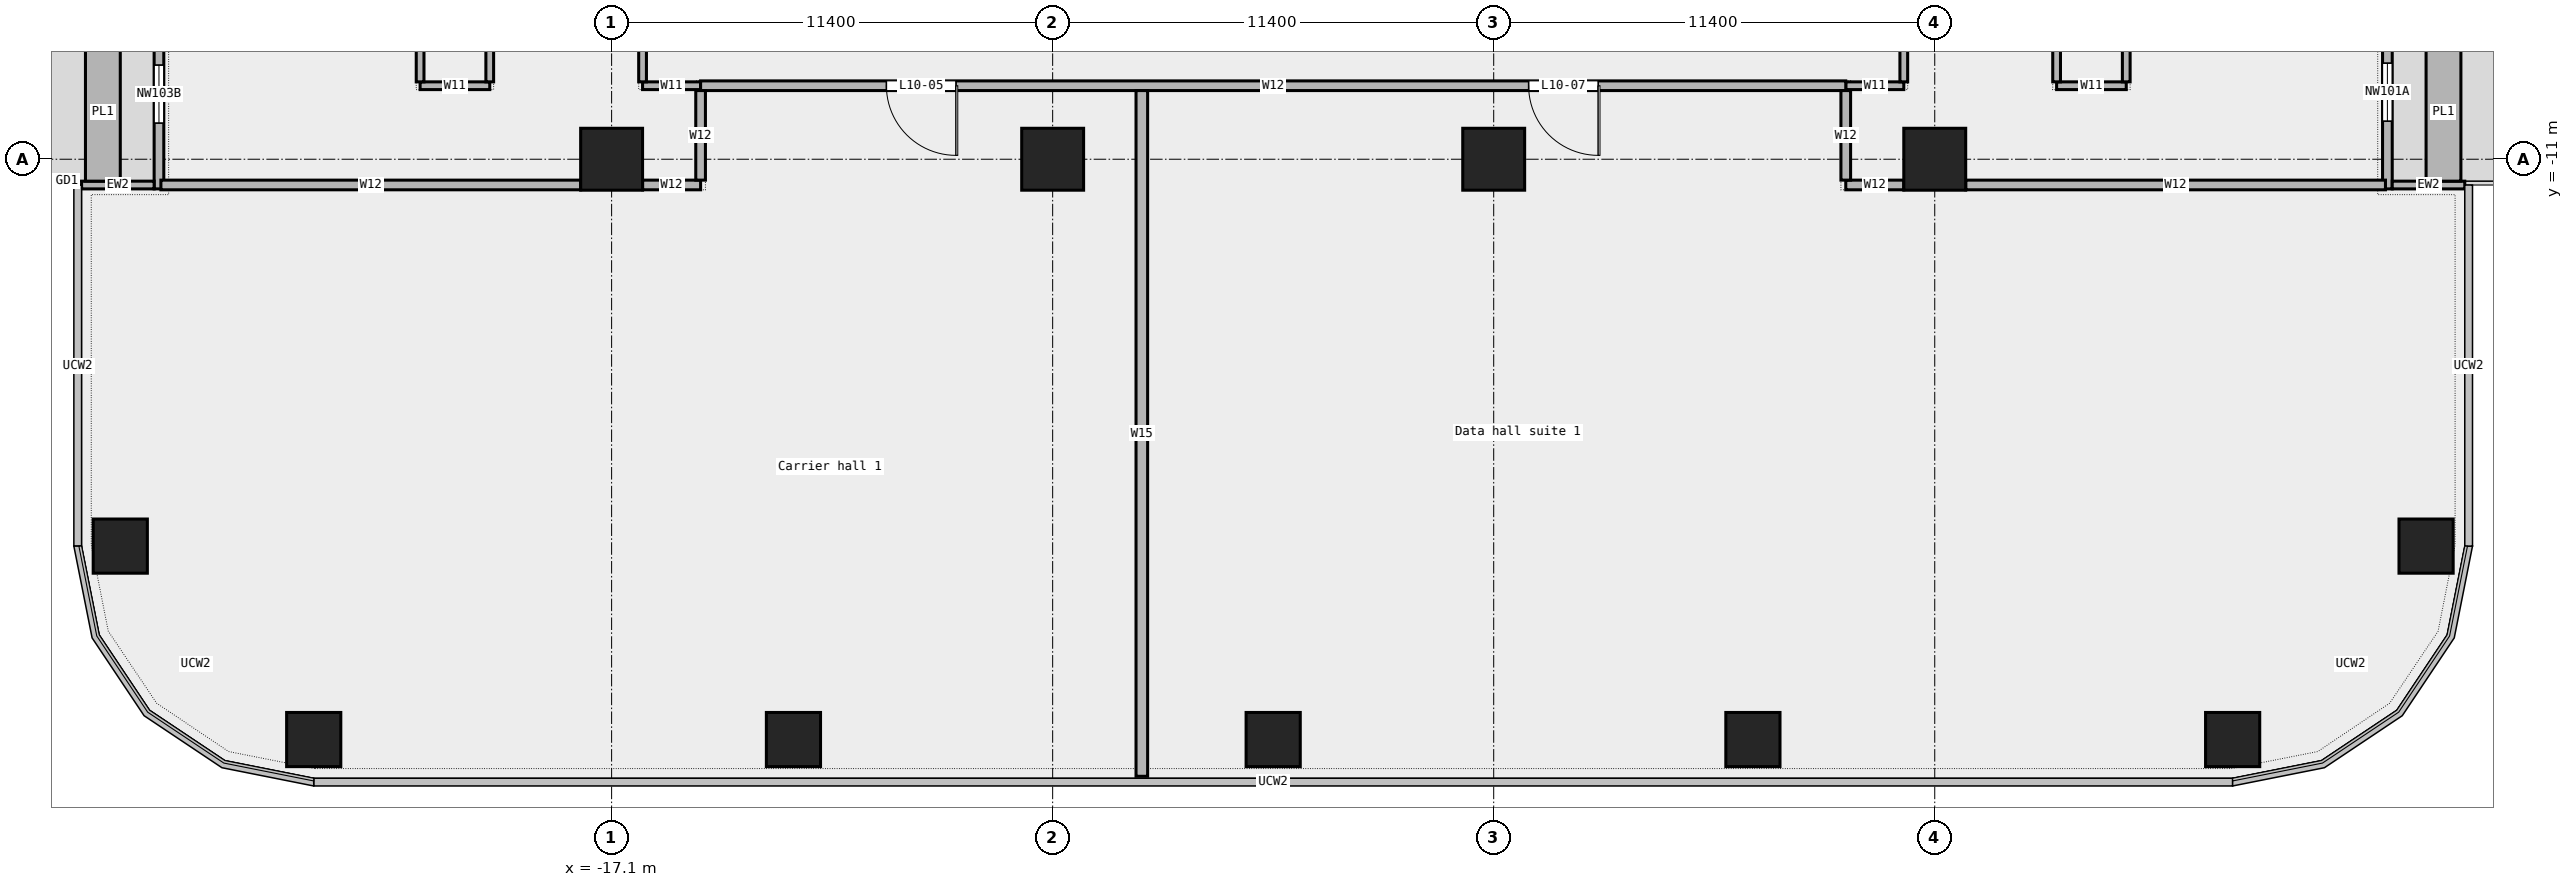
"""IFC4 building model, lengths in metres.
Left out: names, types, materials, properties, quantities, classifications, styles, units other than length and angle.
Written with IfcOpenShell. Run it as: python <this file> out.ifc"""

import sys

from ifc_helpers import new_model, si_unit, direction, frame, frame_2d, origin, origin_2d, place, context, subcontext, project, spatial, rectangle, extrude, element, fill, save


model = new_model("IFC4")
c1 = context("Model", 3, precision=1e-05, world=origin(), true_north=direction((0.0, 1.0)))
c2 = subcontext(c1, "Body", "Model", "MODEL_VIEW")
j1 = project(units=[si_unit("LENGTHUNIT", "METRE"), si_unit("PLANEANGLEUNIT", "RADIAN")], contexts=[c1])
p1 = place(None, origin())
s1 = spatial("IfcSite", under=j1, at=p1, CompositionType="ELEMENT")
p2 = place(p1, origin())
s2 = spatial("IfcBuilding", under=s1, at=p2, CompositionType="ELEMENT")
p3 = place(p2, frame((0.0, 0.0, 55.0)))
s3 = spatial("IfcBuildingStorey", under=s2, at=p3, CompositionType="ELEMENT", Elevation=55.0)
for number, where, z_axis, x_axis in (
    (1, (-24.8, -26.0, 0.0), (0.0, 0.0, 1.0), (1.0, 0.0, 0.0)),
    (2, (-12.4, -26.0, 0.0), (0.0, 0.0, 1.0), (1.0, 0.0, 0.0)),
    (3, (0.0, -26.0, 0.0), (0.0, 0.0, 1.0), (1.0, 0.0, 0.0)),
    (4, (12.4, -26.0, 0.0), (0.0, 0.0, 1.0), (1.0, 0.0, 0.0)),
    (5, (24.8, -26.0, 0.0), (0.0, 0.0, 1.0), (1.0, 0.0, 0.0)),
    (6, (29.8, -21.0, 0.0), (0.0, 0.0, 1.0), (1.0, 0.0, 0.0)),
    (7, (-29.8, -21.0, 0.0), (0.0, 0.0, 1.0), (1.0, 0.0, 0.0)),
):
    element("IfcColumn", number, at=place(p3, frame(where, z_axis=z_axis, x_axis=x_axis)), inside=s3, PredefinedType="COLUMN", context=c2, shape_type="SweptSolid", body=[
        extrude(rectangle(XDim=1.4, YDim=1.4, at=origin_2d()), origin(), (0.0, 0.0, 1.0), 4.35),
    ])
for number, where, z_axis, x_axis in (
    (8, (-17.1, -11.0, 0.0), (0.0, 0.0, 1.0), (1.0, 0.0, 0.0)),
    (9, (-5.7, -11.0, 0.0), (0.0, 0.0, 1.0), (1.0, 0.0, 0.0)),
    (10, (5.7, -11.0, 0.0), (0.0, 0.0, 1.0), (1.0, 0.0, 0.0)),
    (11, (17.1, -11.0, 0.0), (0.0, 0.0, 1.0), (1.0, 0.0, 0.0)),
):
    element("IfcColumn", number, at=place(p3, frame(where, z_axis=z_axis, x_axis=x_axis)), inside=s3, PredefinedType="COLUMN", context=c2, shape_type="SweptSolid", body=[
        extrude(rectangle(XDim=1.6, YDim=1.6, at=origin_2d()), origin(), (0.0, 0.0, 1.0), 4.35),
    ])
p4 = place(p3, frame((28.8, -11.767, 0.0), z_axis=(0.0, 0.0, 1.0), x_axis=(0.0, 1.0, 0.0)))
e12 = element("IfcWall", 12, at=p4, inside=s3, PredefinedType="STANDARD", context=c2, shape_type="SweptSolid", body=[
    extrude(rectangle(XDim=14.2, YDim=0.25, at=frame_2d((7.1, 0.0))), origin(), (0.0, 0.0, 1.0), 4.35),
])
p5 = place(p4, frame((1.75, 0.0, 0.45)))
e13 = element("IfcOpeningElement", 13, at=p5, cuts=e12, PredefinedType="OPENING", context=c2, shape_type="SweptSolid", body=[
    extrude(rectangle(XDim=1.5, YDim=3.0, at=frame_2d((0.75, 1.5))), frame((0.0, 0.137, 0.0), z_axis=(0.0, -1.0, 0.0), x_axis=(1.0, 0.0, 0.0)), (0.0, 0.0, 1.0), 0.274),
])
p6 = place(p4, frame((6.25, 0.0, 0.0)))
e14 = element("IfcOpeningElement", 14, at=p6, cuts=e12, PredefinedType="OPENING", context=c2, shape_type="SweptSolid", body=[
    extrude(rectangle(XDim=1.8, YDim=2.4, at=frame_2d((0.9, 1.2))), frame((0.0, 0.137, 0.0), z_axis=(0.0, -1.0, 0.0), x_axis=(1.0, 0.0, 0.0)), (0.0, 0.0, 1.0), 0.274),
])
p7 = place(p4, frame((11.0, 0.0, 0.45)))
e15 = element("IfcOpeningElement", 15, at=p7, cuts=e12, PredefinedType="OPENING", context=c2, shape_type="SweptSolid", body=[
    extrude(rectangle(XDim=1.5, YDim=3.0, at=frame_2d((0.75, 1.5))), frame((0.0, 0.137, 0.0), z_axis=(0.0, -1.0, 0.0), x_axis=(1.0, 0.0, 0.0)), (0.0, 0.0, 1.0), 0.274),
])
p8 = place(p3, frame((30.8, -11.667, 0.0), z_axis=(0.0, 0.0, 1.0), x_axis=(-1.0, 0.0, 0.0)))
e16 = element("IfcWall", 16, at=p8, inside=s3, PredefinedType="STANDARD", context=c2, shape_type="SweptSolid", body=[
    extrude(rectangle(XDim=1.875, YDim=0.2, at=frame_2d((0.938, 0.0))), origin(), (0.0, 0.0, 1.0), 4.35),
])
p9 = place(p3, frame((30.25, -11.567, 0.0), z_axis=(0.0, 0.0, 1.0), x_axis=(0.0, 1.0, 0.0)))
e17 = element("IfcWall", 17, at=p9, inside=s3, PredefinedType="STANDARD", context=c2, shape_type="SweptSolid", body=[
    extrude(rectangle(XDim=3.6, YDim=0.9, at=frame_2d((1.8, 0.0))), origin(), (0.0, 0.0, 1.0), 0.7),
])
p10 = place(p3, frame((-28.8, 2.433, 0.0), z_axis=(0.0, 0.0, 1.0), x_axis=(0.0, -1.0, 0.0)))
e18 = element("IfcWall", 18, at=p10, inside=s3, PredefinedType="STANDARD", context=c2, shape_type="SweptSolid", body=[
    extrude(rectangle(XDim=14.2, YDim=0.25, at=frame_2d((7.1, 0.0))), origin(), (0.0, 0.0, 1.0), 4.35),
])
p11 = place(p10, frame((1.75, 0.0, 0.45)))
e19 = element("IfcOpeningElement", 19, at=p11, cuts=e18, PredefinedType="OPENING", context=c2, shape_type="SweptSolid", body=[
    extrude(rectangle(XDim=1.5, YDim=3.0, at=frame_2d((0.75, 1.5))), frame((0.0, 0.137, 0.0), z_axis=(0.0, -1.0, 0.0), x_axis=(1.0, 0.0, 0.0)), (0.0, 0.0, 1.0), 0.274),
])
p12 = place(p10, frame((6.25, 0.0, 0.0)))
e20 = element("IfcOpeningElement", 20, at=p12, cuts=e18, PredefinedType="OPENING", context=c2, shape_type="SweptSolid", body=[
    extrude(rectangle(XDim=1.8, YDim=2.4, at=frame_2d((0.9, 1.2))), frame((0.0, 0.137, 0.0), z_axis=(0.0, -1.0, 0.0), x_axis=(1.0, 0.0, 0.0)), (0.0, 0.0, 1.0), 0.274),
])
p13 = place(p10, frame((11.0, 0.0, 0.45)))
e21 = element("IfcOpeningElement", 21, at=p13, cuts=e18, PredefinedType="OPENING", context=c2, shape_type="SweptSolid", body=[
    extrude(rectangle(XDim=1.5, YDim=3.0, at=frame_2d((0.75, 1.5))), frame((0.0, 0.137, 0.0), z_axis=(0.0, -1.0, 0.0), x_axis=(1.0, 0.0, 0.0)), (0.0, 0.0, 1.0), 0.274),
])
p14 = place(p3, frame((-30.8, -11.667, 0.0), z_axis=(0.0, 0.0, 1.0), x_axis=(1.0, 0.0, 0.0)))
e22 = element("IfcWall", 22, at=p14, inside=s3, PredefinedType="STANDARD", context=c2, shape_type="SweptSolid", body=[
    extrude(rectangle(XDim=1.875, YDim=0.2, at=frame_2d((0.938, 0.0))), origin(), (0.0, 0.0, 1.0), 4.35),
])
p15 = place(p3, frame((-30.25, -7.967, 0.0), z_axis=(0.0, 0.0, 1.0), x_axis=(0.0, -1.0, 0.0)))
e23 = element("IfcWall", 23, at=p15, inside=s3, PredefinedType="STANDARD", context=c2, shape_type="SweptSolid", body=[
    extrude(rectangle(XDim=3.6, YDim=0.9, at=frame_2d((1.8, 0.0))), origin(), (0.0, 0.0, 1.0), 0.7),
])
p16 = place(p3, frame((-28.75, -11.665, 0.0), z_axis=(0.0, 0.0, 1.0), x_axis=(1.0, 0.0, 0.0)))
e24 = element("IfcWall", 24, at=p16, inside=s3, PredefinedType="PARTITIONING", context=c2, shape_type="SweptSolid", body=[
    extrude(rectangle(XDim=10.85, YDim=0.25, at=frame_2d((5.425, 0.0))), origin(), (0.0, 0.0, 1.0), 4.35),
])
for number, where, z_axis, x_axis in (
    (25, (-16.3, -11.665, 0.0), (0.0, 0.0, 1.0), (1.0, 0.0, 0.0)),
    (26, (14.8, -11.665, 0.0), (0.0, 0.0, 1.0), (1.0, 0.0, 0.0)),
):
    element("IfcWall", number, at=place(p3, frame(where, z_axis=z_axis, x_axis=x_axis)), inside=s3, PredefinedType="PARTITIONING", context=c2, shape_type="SweptSolid", body=[
        extrude(rectangle(XDim=1.5, YDim=0.25, at=frame_2d((0.75, 0.0))), origin(), (0.0, 0.0, 1.0), 4.35),
    ])
p17 = place(p3, frame((17.9, -11.665, 0.0), z_axis=(0.0, 0.0, 1.0), x_axis=(1.0, 0.0, 0.0)))
e27 = element("IfcWall", 27, at=p17, inside=s3, PredefinedType="PARTITIONING", context=c2, shape_type="SweptSolid", body=[
    extrude(rectangle(XDim=10.85, YDim=0.25, at=frame_2d((5.425, 0.0))), origin(), (0.0, 0.0, 1.0), 4.35),
])
p18 = place(p3, frame((-22.05, -9.1, 0.0), z_axis=(0.0, 0.0, 1.0), x_axis=(1.0, 0.0, 0.0)))
e28 = element("IfcWall", 28, at=p18, inside=s3, PredefinedType="PARTITIONING", context=c2, shape_type="SweptSolid", body=[
    extrude(rectangle(XDim=1.8, YDim=0.2, at=frame_2d((0.9, 0.0))), origin(), (0.0, 0.0, 1.0), 4.35),
])
for number, where, z_axis, x_axis in (
    (29, (-16.3, -9.1, 0.0), (0.0, 0.0, 1.0), (1.0, 0.0, 0.0)),
    (30, (14.8, -9.1, 0.0), (0.0, 0.0, 1.0), (1.0, 0.0, 0.0)),
):
    element("IfcWall", number, at=place(p3, frame(where, z_axis=z_axis, x_axis=x_axis)), inside=s3, PredefinedType="PARTITIONING", context=c2, shape_type="SweptSolid", body=[
        extrude(rectangle(XDim=1.5, YDim=0.2, at=frame_2d((0.75, 0.0))), origin(), (0.0, 0.0, 1.0), 4.35),
    ])
p19 = place(p3, frame((20.25, -9.1, 0.0), z_axis=(0.0, 0.0, 1.0), x_axis=(1.0, 0.0, 0.0)))
e31 = element("IfcWall", 31, at=p19, inside=s3, PredefinedType="PARTITIONING", context=c2, shape_type="SweptSolid", body=[
    extrude(rectangle(XDim=1.8, YDim=0.2, at=frame_2d((0.9, 0.0))), origin(), (0.0, 0.0, 1.0), 4.35),
])
p20 = place(p3, frame((-14.8, -9.1, 0.0), z_axis=(0.0, 0.0, 1.0), x_axis=(1.0, 0.0, 0.0)))
e32 = element("IfcWall", 32, at=p20, inside=s3, PredefinedType="PARTITIONING", context=c2, shape_type="SweptSolid", body=[
    extrude(rectangle(XDim=29.6, YDim=0.25, at=frame_2d((14.8, 0.0))), origin(), (0.0, 0.0, 1.0), 4.35),
])
p21 = place(p20, frame((4.802, 0.0, 0.0)))
e33 = element("IfcOpeningElement", 33, at=p21, cuts=e32, PredefinedType="OPENING", context=c2, shape_type="SweptSolid", body=[
    extrude(rectangle(XDim=1.8, YDim=2.1, at=frame_2d((0.9, 1.05))), frame((0.0, 0.137, 0.0), z_axis=(0.0, -1.0, 0.0), x_axis=(1.0, 0.0, 0.0)), (0.0, 0.0, 1.0), 0.274),
])
p22 = place(p20, frame((21.403, 0.0, 0.0)))
e34 = element("IfcOpeningElement", 34, at=p22, cuts=e32, PredefinedType="OPENING", context=c2, shape_type="SweptSolid", body=[
    extrude(rectangle(XDim=1.8, YDim=2.1, at=frame_2d((0.9, 1.05))), frame((0.0, 0.137, 0.0), z_axis=(0.0, -1.0, 0.0), x_axis=(1.0, 0.0, 0.0)), (0.0, 0.0, 1.0), 0.274),
])
p23 = place(p3, frame((-22.05, -9.0, 0.0), z_axis=(0.0, 0.0, 1.0), x_axis=(0.0, 1.0, 0.0)))
e35 = element("IfcWall", 35, at=p23, inside=s3, PredefinedType="PARTITIONING", context=c2, shape_type="SweptSolid", body=[
    extrude(rectangle(XDim=24.3, YDim=0.2, at=frame_2d((12.15, 0.0))), origin(), (0.0, 0.0, 1.0), 4.35),
])
p24 = place(p23, frame((17.067, 0.0, 0.0)))
e36 = element("IfcOpeningElement", 36, at=p24, cuts=e35, PredefinedType="OPENING", context=c2, shape_type="SweptSolid", body=[
    extrude(rectangle(XDim=1.5, YDim=2.1, at=frame_2d((0.75, 1.05))), frame((0.0, 0.112, 0.0), z_axis=(0.0, -1.0, 0.0), x_axis=(1.0, 0.0, 0.0)), (0.0, 0.0, 1.0), 0.224),
])
p25 = place(p23, frame((4.768, 0.0, 0.0)))
e37 = element("IfcOpeningElement", 37, at=p25, cuts=e35, PredefinedType="OPENING", context=c2, shape_type="SweptSolid", body=[
    extrude(rectangle(XDim=1.8, YDim=2.1, at=frame_2d((0.9, 1.05))), frame((0.0, 0.112, 0.0), z_axis=(0.0, -1.0, 0.0), x_axis=(1.0, 0.0, 0.0)), (0.0, 0.0, 1.0), 0.224),
])
p26 = place(p3, frame((-20.25, -9.0, 0.0), z_axis=(0.0, 0.0, 1.0), x_axis=(0.0, 1.0, 0.0)))
e38 = element("IfcWall", 38, at=p26, inside=s3, PredefinedType="PARTITIONING", context=c2, shape_type="SweptSolid", body=[
    extrude(rectangle(XDim=11.15, YDim=0.2, at=frame_2d((5.575, 0.0))), origin(), (0.0, 0.0, 1.0), 4.35),
])
p27 = place(p3, frame((-16.3, -9.0, 0.0), z_axis=(0.0, 0.0, 1.0), x_axis=(0.0, 1.0, 0.0)))
e39 = element("IfcWall", 39, at=p27, inside=s3, PredefinedType="PARTITIONING", context=c2, shape_type="SweptSolid", body=[
    extrude(rectangle(XDim=8.2, YDim=0.2, at=frame_2d((4.1, 0.0))), origin(), (0.0, 0.0, 1.0), 4.35),
])
p28 = place(p3, frame((-14.8, -11.54, 0.0), z_axis=(0.0, 0.0, 1.0), x_axis=(0.0, 1.0, 0.0)))
e40 = element("IfcWall", 40, at=p28, inside=s3, PredefinedType="PARTITIONING", context=c2, shape_type="SweptSolid", body=[
    extrude(rectangle(XDim=2.315, YDim=0.25, at=frame_2d((1.157, 0.0))), origin(), (0.0, 0.0, 1.0), 4.35),
])
p29 = place(p3, frame((-3.395, -26.95, 0.0), z_axis=(0.0, 0.0, 1.0), x_axis=(0.0, 1.0, 0.0)))
e41 = element("IfcWall", 41, at=p29, inside=s3, PredefinedType="PARTITIONING", context=c2, shape_type="SweptSolid", body=[
    extrude(rectangle(XDim=17.725, YDim=0.3, at=frame_2d((8.862, 0.0))), origin(), (0.0, 0.0, 1.0), 4.35),
])
p30 = place(p3, frame((14.8, -11.54, 0.0), z_axis=(0.0, 0.0, 1.0), x_axis=(0.0, 1.0, 0.0)))
e42 = element("IfcWall", 42, at=p30, inside=s3, PredefinedType="PARTITIONING", context=c2, shape_type="SweptSolid", body=[
    extrude(rectangle(XDim=2.315, YDim=0.25, at=frame_2d((1.157, 0.0))), origin(), (0.0, 0.0, 1.0), 4.35),
])
p31 = place(p3, frame((16.3, -9.0, 0.0), z_axis=(0.0, 0.0, 1.0), x_axis=(0.0, 1.0, 0.0)))
e43 = element("IfcWall", 43, at=p31, inside=s3, PredefinedType="PARTITIONING", context=c2, shape_type="SweptSolid", body=[
    extrude(rectangle(XDim=8.2, YDim=0.2, at=frame_2d((4.1, 0.0))), origin(), (0.0, 0.0, 1.0), 4.35),
])
p32 = place(p3, frame((20.25, -9.0, 0.0), z_axis=(0.0, 0.0, 1.0), x_axis=(0.0, 1.0, 0.0)))
e44 = element("IfcWall", 44, at=p32, inside=s3, PredefinedType="PARTITIONING", context=c2, shape_type="SweptSolid", body=[
    extrude(rectangle(XDim=11.15, YDim=0.2, at=frame_2d((5.575, 0.0))), origin(), (0.0, 0.0, 1.0), 4.35),
])
p33 = place(p3, frame((22.05, -9.0, 0.0), z_axis=(0.0, 0.0, 1.0), x_axis=(0.0, 1.0, 0.0)))
e45 = element("IfcWall", 45, at=p33, inside=s3, PredefinedType="PARTITIONING", context=c2, shape_type="SweptSolid", body=[
    extrude(rectangle(XDim=11.21, YDim=0.2, at=frame_2d((5.605, 0.0))), origin(), (0.0, 0.0, 1.0), 4.35),
])
p34 = place(p33, frame((4.705, 0.0, 0.0)))
e46 = element("IfcOpeningElement", 46, at=p34, cuts=e45, PredefinedType="OPENING", context=c2, shape_type="SweptSolid", body=[
    extrude(rectangle(XDim=1.8, YDim=2.1, at=frame_2d((0.9, 1.05))), frame((0.0, 0.112, 0.0), z_axis=(0.0, -1.0, 0.0), x_axis=(1.0, 0.0, 0.0)), (0.0, 0.0, 1.0), 0.224),
])
p35 = place(p5, origin())
e47 = element("IfcWindow", 47, at=p35, inside=s3, PartitioningType="SINGLE_PANEL", PredefinedType="WINDOW", context=c2, shape_type="SweptSolid", body=[
    extrude(rectangle(XDim=1.5, YDim=3.0, at=frame_2d((0.75, 1.5))), frame((0.0, 0.03, 0.0), z_axis=(0.0, -1.0, 0.0), x_axis=(1.0, 0.0, 0.0)), (0.0, 0.0, 1.0), 0.06),
])
fill(e13, e47)
p36 = place(p13, origin())
e48 = element("IfcWindow", 48, at=p36, inside=s3, PartitioningType="SINGLE_PANEL", PredefinedType="WINDOW", context=c2, shape_type="SweptSolid", body=[
    extrude(rectangle(XDim=1.5, YDim=3.0, at=frame_2d((0.75, 1.5))), frame((0.0, 0.03, 0.0), z_axis=(0.0, -1.0, 0.0), x_axis=(1.0, 0.0, 0.0)), (0.0, 0.0, 1.0), 0.06),
])
fill(e21, e48)
p37 = place(p21, origin())
e49 = element("IfcDoor", 49, at=p37, inside=s3, OperationType="DOUBLE_DOOR_SINGLE_SWING", PredefinedType="DOOR", context=c2, shape_type="SweptSolid", body=[
    extrude(rectangle(XDim=1.8, YDim=2.1, at=frame_2d((0.9, 1.05))), frame((0.0, 0.025, 0.0), z_axis=(0.0, -1.0, 0.0), x_axis=(1.0, 0.0, 0.0)), (0.0, 0.0, 1.0), 0.05),
])
fill(e33, e49)
p38 = place(p22, origin())
e50 = element("IfcDoor", 50, at=p38, inside=s3, OperationType="DOUBLE_DOOR_SINGLE_SWING", PredefinedType="DOOR", context=c2, shape_type="SweptSolid", body=[
    extrude(rectangle(XDim=1.8, YDim=2.1, at=frame_2d((0.9, 1.05))), frame((0.0, 0.025, 0.0), z_axis=(0.0, -1.0, 0.0), x_axis=(1.0, 0.0, 0.0)), (0.0, 0.0, 1.0), 0.05),
])
fill(e34, e50)
save(model, sys.argv[1])
